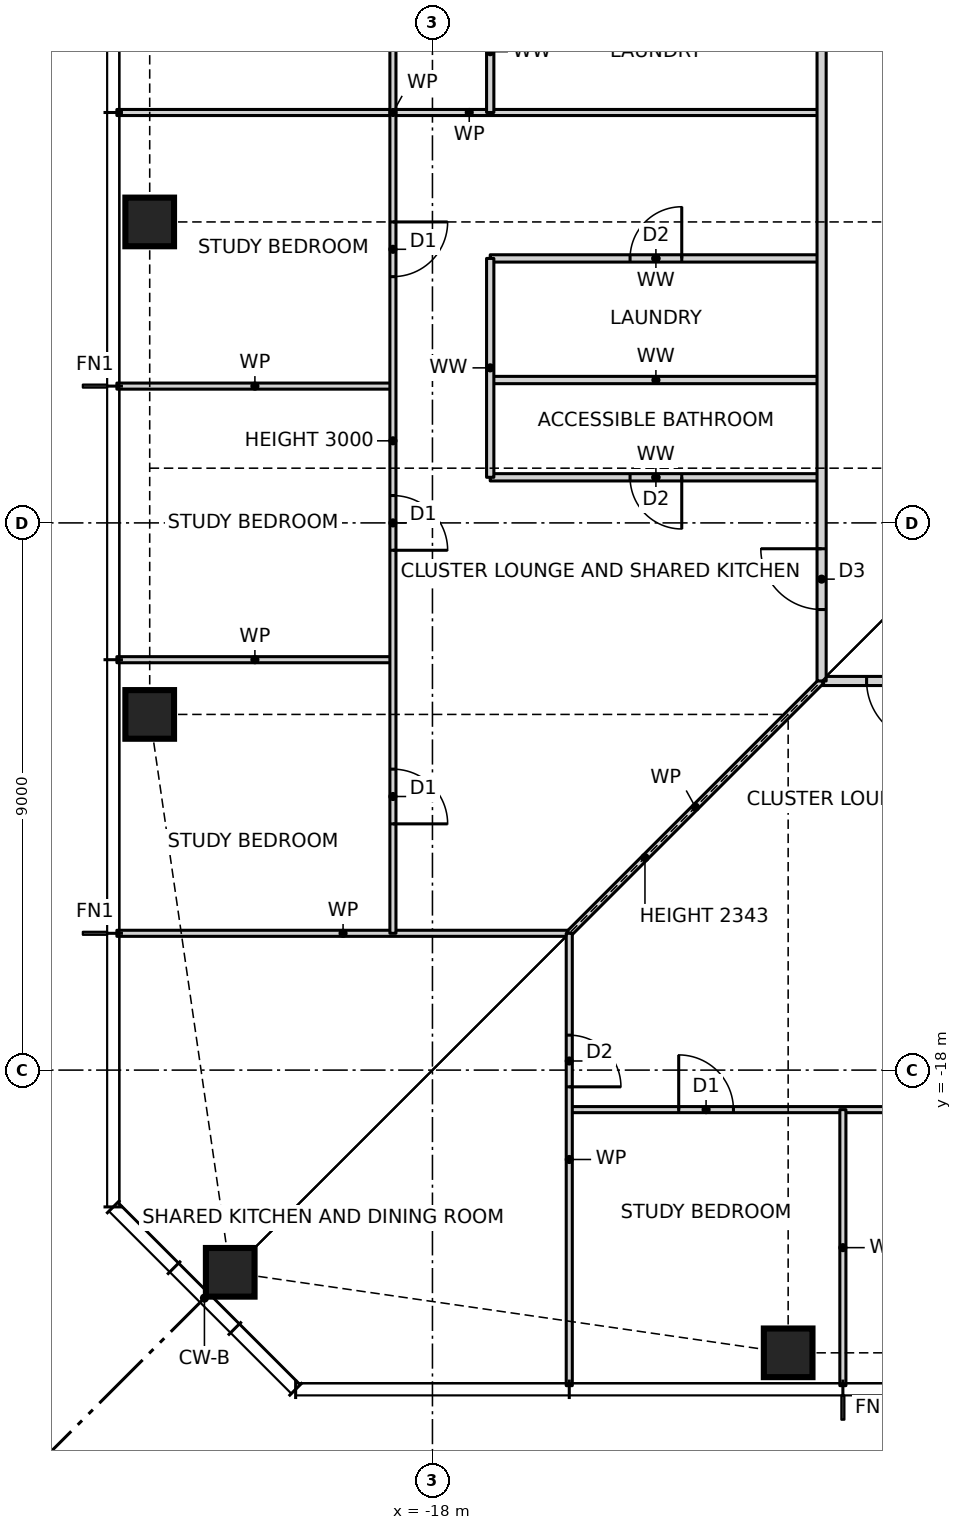
"""IFC4 building model, lengths in metres.
Left out: names, types, materials, properties, quantities, classifications, styles, units other than length and angle.
Written with IfcOpenShell. Run it as: python <this file> out.ifc"""

import sys

from ifc_helpers import new_model, si_unit, direction, frame, frame_2d, origin, origin_2d, place, context, subcontext, project, spatial, rectangle, hollow_rectangle, extrude, element, fill, save


model = new_model("IFC4")
c1 = context("Model", 3, precision=1e-05, world=origin(), true_north=direction((0.0, 1.0)))
c2 = subcontext(c1, "Body", "Model", "MODEL_VIEW")
j1 = project(units=[si_unit("LENGTHUNIT", "METRE"), si_unit("PLANEANGLEUNIT", "RADIAN")], contexts=[c1])
p1 = place(None, origin())
s1 = spatial("IfcSite", under=j1, at=p1, CompositionType="ELEMENT")
p2 = place(p1, origin())
s2 = spatial("IfcBuilding", under=s1, at=p2, CompositionType="ELEMENT")
p3 = place(p2, frame((0.0, 0.0, 67.5)))
s3 = spatial("IfcBuildingStorey", under=s2, at=p3, CompositionType="ELEMENT", Elevation=67.5)
for number, where, z_axis, x_axis in (
    (1, (-21.326, -21.326, 0.0), (0.0, 0.0, 1.0), (1.0, 0.0, 0.0)),
    (2, (-12.15, -22.65, 0.0), (0.0, 0.0, 1.0), (1.0, 0.0, 0.0)),
    (3, (-22.65, -4.05, 0.0), (0.0, 0.0, 1.0), (1.0, 0.0, 0.0)),
    (4, (-22.65, -12.15, 0.0), (0.0, 0.0, 1.0), (1.0, 0.0, 0.0)),
):
    element("IfcColumn", number, at=place(p3, frame(where, z_axis=z_axis, x_axis=x_axis)), inside=s3, PredefinedType="COLUMN", context=c2, shape_type="SweptSolid", body=[
        extrude(hollow_rectangle(XDim=0.8, YDim=0.8, WallThickness=0.09, at=origin_2d()), origin(), (0.0, 0.0, 1.0), 3.5),
    ])
p4 = place(p3, frame((-15.75, -18.65, 0.0), z_axis=(0.0, 0.0, 1.0), x_axis=(1.0, 0.0, 0.0)))
e5 = element("IfcWall", 5, at=p4, inside=s3, PredefinedType="PARTITIONING", context=c2, shape_type="SweptSolid", body=[
    extrude(rectangle(XDim=31.5, YDim=0.1, at=frame_2d((15.75, 0.0))), origin(), (0.0, 0.0, 1.0), 3.27),
])
p5 = place(p4, frame((1.8, 0.0, 0.0)))
e6 = element("IfcOpeningElement", 6, at=p5, cuts=e5, PredefinedType="OPENING", context=c2, shape_type="SweptSolid", body=[
    extrude(rectangle(XDim=0.9, YDim=2.1, at=frame_2d((0.45, 1.05))), frame((0.0, 0.06, 0.0), z_axis=(0.0, -1.0, 0.0), x_axis=(1.0, 0.0, 0.0)), (0.0, 0.0, 1.0), 0.12),
])
p6 = place(p4, frame((6.3, 0.0, 0.0)))
e7 = element("IfcOpeningElement", 7, at=p6, cuts=e5, PredefinedType="OPENING", context=c2, shape_type="SweptSolid", body=[
    extrude(rectangle(XDim=0.9, YDim=2.1, at=frame_2d((0.45, 1.05))), frame((0.0, 0.06, 0.0), z_axis=(0.0, -1.0, 0.0), x_axis=(1.0, 0.0, 0.0)), (0.0, 0.0, 1.0), 0.12),
])
p7 = place(p4, frame((10.8, 0.0, 0.0)))
e8 = element("IfcOpeningElement", 8, at=p7, cuts=e5, PredefinedType="OPENING", context=c2, shape_type="SweptSolid", body=[
    extrude(rectangle(XDim=0.9, YDim=2.1, at=frame_2d((0.45, 1.05))), frame((0.0, 0.06, 0.0), z_axis=(0.0, -1.0, 0.0), x_axis=(1.0, 0.0, 0.0)), (0.0, 0.0, 1.0), 0.12),
])
p8 = place(p4, frame((15.3, 0.0, 0.0)))
e9 = element("IfcOpeningElement", 9, at=p8, cuts=e5, PredefinedType="OPENING", context=c2, shape_type="SweptSolid", body=[
    extrude(rectangle(XDim=0.9, YDim=2.1, at=frame_2d((0.45, 1.05))), frame((0.0, 0.06, 0.0), z_axis=(0.0, -1.0, 0.0), x_axis=(1.0, 0.0, 0.0)), (0.0, 0.0, 1.0), 0.12),
])
p9 = place(p4, frame((19.8, 0.0, 0.0)))
e10 = element("IfcOpeningElement", 10, at=p9, cuts=e5, PredefinedType="OPENING", context=c2, shape_type="SweptSolid", body=[
    extrude(rectangle(XDim=0.9, YDim=2.1, at=frame_2d((0.45, 1.05))), frame((0.0, 0.06, 0.0), z_axis=(0.0, -1.0, 0.0), x_axis=(1.0, 0.0, 0.0)), (0.0, 0.0, 1.0), 0.12),
])
p10 = place(p4, frame((24.3, 0.0, 0.0)))
e11 = element("IfcOpeningElement", 11, at=p10, cuts=e5, PredefinedType="OPENING", context=c2, shape_type="SweptSolid", body=[
    extrude(rectangle(XDim=0.9, YDim=2.1, at=frame_2d((0.45, 1.05))), frame((0.0, 0.06, 0.0), z_axis=(0.0, -1.0, 0.0), x_axis=(1.0, 0.0, 0.0)), (0.0, 0.0, 1.0), 0.12),
])
p11 = place(p4, frame((28.8, 0.0, 0.0)))
e12 = element("IfcOpeningElement", 12, at=p11, cuts=e5, PredefinedType="OPENING", context=c2, shape_type="SweptSolid", body=[
    extrude(rectangle(XDim=0.9, YDim=2.1, at=frame_2d((0.45, 1.05))), frame((0.0, 0.06, 0.0), z_axis=(0.0, -1.0, 0.0), x_axis=(1.0, 0.0, 0.0)), (0.0, 0.0, 1.0), 0.12),
])
p12 = place(p3, frame((-23.19, -15.75, 0.0), z_axis=(0.0, 0.0, 1.0), x_axis=(1.0, 0.0, 0.0)))
e13 = element("IfcWall", 13, at=p12, inside=s3, PredefinedType="PARTITIONING", context=c2, shape_type="SweptSolid", body=[
    extrude(rectangle(XDim=7.44, YDim=0.1, at=frame_2d((3.72, 0.0))), origin(), (0.0, 0.0, 1.0), 3.27),
])
p13 = place(p3, frame((-11.6, -11.6, 0.0), z_axis=(0.0, 0.0, 1.0), x_axis=(1.0, 0.0, 0.0)))
e14 = element("IfcWall", 14, at=p13, inside=s3, PredefinedType="PARTITIONING", context=c2, shape_type="SweptSolid", body=[
    extrude(rectangle(XDim=24.2, YDim=0.15, at=frame_2d((12.1, 0.0))), origin(), (0.0, 0.0, 1.0), 3.27),
])
p14 = place(p13, frame((0.74, 0.0, 0.0)))
e15 = element("IfcOpeningElement", 15, at=p14, cuts=e14, PredefinedType="OPENING", context=c2, shape_type="SweptSolid", body=[
    extrude(rectangle(XDim=1.0, YDim=2.1, at=frame_2d((0.5, 1.05))), frame((0.0, 0.085, 0.0), z_axis=(0.0, -1.0, 0.0), x_axis=(1.0, 0.0, 0.0)), (0.0, 0.0, 1.0), 0.17),
])
p15 = place(p13, frame((21.025, 0.0, 0.0)))
e16 = element("IfcOpeningElement", 16, at=p15, cuts=e14, PredefinedType="OPENING", context=c2, shape_type="SweptSolid", body=[
    extrude(rectangle(XDim=1.0, YDim=2.1, at=frame_2d((0.5, 1.05))), frame((0.0, 0.085, 0.0), z_axis=(0.0, -1.0, 0.0), x_axis=(1.0, 0.0, 0.0)), (0.0, 0.0, 1.0), 0.17),
])
p16 = place(p3, frame((-23.19, -11.25, 0.0), z_axis=(0.0, 0.0, 1.0), x_axis=(1.0, 0.0, 0.0)))
e17 = element("IfcWall", 17, at=p16, inside=s3, PredefinedType="PARTITIONING", context=c2, shape_type="SweptSolid", body=[
    extrude(rectangle(XDim=4.54, YDim=0.1, at=frame_2d((2.27, 0.0))), origin(), (0.0, 0.0, 1.0), 3.27),
])
p17 = place(p3, frame((-17.05, -8.25, 0.0), z_axis=(0.0, 0.0, 1.0), x_axis=(1.0, 0.0, 0.0)))
e18 = element("IfcWall", 18, at=p17, inside=s3, PredefinedType="PARTITIONING", context=c2, shape_type="SweptSolid", body=[
    extrude(rectangle(XDim=5.45, YDim=0.12, at=frame_2d((2.725, 0.0))), origin(), (0.0, 0.0, 1.0), 3.27),
])
p18 = place(p17, frame((2.3, 0.0, 0.0)))
e19 = element("IfcOpeningElement", 19, at=p18, cuts=e18, PredefinedType="OPENING", context=c2, shape_type="SweptSolid", body=[
    extrude(rectangle(XDim=0.85, YDim=2.1, at=frame_2d((0.425, 1.05))), frame((0.0, 0.07, 0.0), z_axis=(0.0, -1.0, 0.0), x_axis=(1.0, 0.0, 0.0)), (0.0, 0.0, 1.0), 0.14),
])
p19 = place(p3, frame((-23.19, -6.75, 0.0), z_axis=(0.0, 0.0, 1.0), x_axis=(1.0, 0.0, 0.0)))
e20 = element("IfcWall", 20, at=p19, inside=s3, PredefinedType="PARTITIONING", context=c2, shape_type="SweptSolid", body=[
    extrude(rectangle(XDim=4.54, YDim=0.1, at=frame_2d((2.27, 0.0))), origin(), (0.0, 0.0, 1.0), 3.27),
])
p20 = place(p3, frame((-17.05, -6.65, 0.0), z_axis=(0.0, 0.0, 1.0), x_axis=(1.0, 0.0, 0.0)))
e21 = element("IfcWall", 21, at=p20, inside=s3, PredefinedType="PARTITIONING", context=c2, shape_type="SweptSolid", body=[
    extrude(rectangle(XDim=5.45, YDim=0.12, at=frame_2d((2.725, 0.0))), origin(), (0.0, 0.0, 1.0), 3.27),
])
p21 = place(p3, frame((-17.05, -4.65, 0.0), z_axis=(0.0, 0.0, 1.0), x_axis=(1.0, 0.0, 0.0)))
e22 = element("IfcWall", 22, at=p21, inside=s3, PredefinedType="PARTITIONING", context=c2, shape_type="SweptSolid", body=[
    extrude(rectangle(XDim=5.45, YDim=0.12, at=frame_2d((2.725, 0.0))), origin(), (0.0, 0.0, 1.0), 3.27),
])
p22 = place(p21, frame((2.3, 0.0, 0.0)))
e23 = element("IfcOpeningElement", 23, at=p22, cuts=e22, PredefinedType="OPENING", context=c2, shape_type="SweptSolid", body=[
    extrude(rectangle(XDim=0.85, YDim=2.1, at=frame_2d((0.425, 1.05))), frame((0.0, 0.07, 0.0), z_axis=(0.0, -1.0, 0.0), x_axis=(1.0, 0.0, 0.0)), (0.0, 0.0, 1.0), 0.14),
])
p23 = place(p3, frame((-23.19, -2.25, 0.0), z_axis=(0.0, 0.0, 1.0), x_axis=(1.0, 0.0, 0.0)))
e24 = element("IfcWall", 24, at=p23, inside=s3, PredefinedType="PARTITIONING", context=c2, shape_type="SweptSolid", body=[
    extrude(rectangle(XDim=11.59, YDim=0.1, at=frame_2d((5.795, 0.0))), origin(), (0.0, 0.0, 1.0), 3.27),
])
p24 = place(p3, frame((-15.75, -15.75, 0.0), z_axis=(0.0, 0.0, 1.0), x_axis=(0.707106781187, 0.707106781187, 0.0)))
e25 = element("IfcWall", 25, at=p24, inside=s3, PredefinedType="PARTITIONING", context=c2, shape_type="SweptSolid", body=[
    extrude(rectangle(XDim=5.869, YDim=0.1, at=frame_2d((2.935, 0.0))), origin(), (0.0, 0.0, 1.0), 2.343),
])
p25 = place(p3, frame((-11.25, -23.19, 0.0), z_axis=(0.0, 0.0, 1.0), x_axis=(0.0, 1.0, 0.0)))
e26 = element("IfcWall", 26, at=p25, inside=s3, PredefinedType="PARTITIONING", context=c2, shape_type="SweptSolid", body=[
    extrude(rectangle(XDim=4.54, YDim=0.1, at=frame_2d((2.27, 0.0))), origin(), (0.0, 0.0, 1.0), 3.27),
])
p26 = place(p3, frame((-11.6, -11.6, 0.0), z_axis=(0.0, 0.0, 1.0), x_axis=(0.0, 1.0, 0.0)))
e27 = element("IfcWall", 27, at=p26, inside=s3, PredefinedType="PARTITIONING", context=c2, shape_type="SweptSolid", body=[
    extrude(rectangle(XDim=23.2, YDim=0.15, at=frame_2d((11.6, 0.0))), origin(), (0.0, 0.0, 1.0), 3.27),
])
p27 = place(p26, frame((18.6, 0.0, 0.0)))
e28 = element("IfcOpeningElement", 28, at=p27, cuts=e27, PredefinedType="OPENING", context=c2, shape_type="SweptSolid", body=[
    extrude(rectangle(XDim=1.0, YDim=2.1, at=frame_2d((0.5, 1.05))), frame((0.0, 0.085, 0.0), z_axis=(0.0, -1.0, 0.0), x_axis=(1.0, 0.0, 0.0)), (0.0, 0.0, 1.0), 0.17),
])
p28 = place(p26, frame((1.175, 0.0, 0.0)))
e29 = element("IfcOpeningElement", 29, at=p28, cuts=e27, PredefinedType="OPENING", context=c2, shape_type="SweptSolid", body=[
    extrude(rectangle(XDim=1.0, YDim=2.1, at=frame_2d((0.5, 1.05))), frame((0.0, 0.085, 0.0), z_axis=(0.0, -1.0, 0.0), x_axis=(1.0, 0.0, 0.0)), (0.0, 0.0, 1.0), 0.17),
])
p29 = place(p3, frame((-15.75, -23.19, 0.0), z_axis=(0.0, 0.0, 1.0), x_axis=(0.0, 1.0, 0.0)))
e30 = element("IfcWall", 30, at=p29, inside=s3, PredefinedType="PARTITIONING", context=c2, shape_type="SweptSolid", body=[
    extrude(rectangle(XDim=7.44, YDim=0.1, at=frame_2d((3.72, 0.0))), origin(), (0.0, 0.0, 1.0), 3.27),
])
p30 = place(p29, frame((4.915, 0.0, 0.0)))
e31 = element("IfcOpeningElement", 31, at=p30, cuts=e30, PredefinedType="OPENING", context=c2, shape_type="SweptSolid", body=[
    extrude(rectangle(XDim=0.85, YDim=2.1, at=frame_2d((0.425, 1.05))), frame((0.0, 0.06, 0.0), z_axis=(0.0, -1.0, 0.0), x_axis=(1.0, 0.0, 0.0)), (0.0, 0.0, 1.0), 0.12),
])
p31 = place(p3, frame((-17.05, -8.25, 0.0), z_axis=(0.0, 0.0, 1.0), x_axis=(0.0, 1.0, 0.0)))
e32 = element("IfcWall", 32, at=p31, inside=s3, PredefinedType="PARTITIONING", context=c2, shape_type="SweptSolid", body=[
    extrude(rectangle(XDim=3.6, YDim=0.12, at=frame_2d((1.8, 0.0))), origin(), (0.0, 0.0, 1.0), 3.27),
])
p32 = place(p3, frame((-17.05, -2.25, 0.0), z_axis=(0.0, 0.0, 1.0), x_axis=(0.0, 1.0, 0.0)))
e33 = element("IfcWall", 33, at=p32, inside=s3, PredefinedType="PARTITIONING", context=c2, shape_type="SweptSolid", body=[
    extrude(rectangle(XDim=2.0, YDim=0.12, at=frame_2d((1.0, 0.0))), origin(), (0.0, 0.0, 1.0), 3.27),
])
p33 = place(p3, frame((-18.65, -15.75, 0.0), z_axis=(0.0, 0.0, 1.0), x_axis=(0.0, 1.0, 0.0)))
e34 = element("IfcWall", 34, at=p33, inside=s3, PredefinedType="PARTITIONING", context=c2, shape_type="SweptSolid", body=[
    extrude(rectangle(XDim=27.0, YDim=0.1, at=frame_2d((13.5, 0.0))), origin(), (0.0, 0.0, 1.0), 3.0),
])
p34 = place(p33, frame((24.3, 0.0, 0.0)))
e35 = element("IfcOpeningElement", 35, at=p34, cuts=e34, PredefinedType="OPENING", context=c2, shape_type="SweptSolid", body=[
    extrude(rectangle(XDim=0.9, YDim=2.1, at=frame_2d((0.45, 1.05))), frame((0.0, 0.06, 0.0), z_axis=(0.0, -1.0, 0.0), x_axis=(1.0, 0.0, 0.0)), (0.0, 0.0, 1.0), 0.12),
])
p35 = place(p33, frame((19.8, 0.0, 0.0)))
e36 = element("IfcOpeningElement", 36, at=p35, cuts=e34, PredefinedType="OPENING", context=c2, shape_type="SweptSolid", body=[
    extrude(rectangle(XDim=0.9, YDim=2.1, at=frame_2d((0.45, 1.05))), frame((0.0, 0.06, 0.0), z_axis=(0.0, -1.0, 0.0), x_axis=(1.0, 0.0, 0.0)), (0.0, 0.0, 1.0), 0.12),
])
p36 = place(p33, frame((15.3, 0.0, 0.0)))
e37 = element("IfcOpeningElement", 37, at=p36, cuts=e34, PredefinedType="OPENING", context=c2, shape_type="SweptSolid", body=[
    extrude(rectangle(XDim=0.9, YDim=2.1, at=frame_2d((0.45, 1.05))), frame((0.0, 0.06, 0.0), z_axis=(0.0, -1.0, 0.0), x_axis=(1.0, 0.0, 0.0)), (0.0, 0.0, 1.0), 0.12),
])
p37 = place(p33, frame((10.8, 0.0, 0.0)))
e38 = element("IfcOpeningElement", 38, at=p37, cuts=e34, PredefinedType="OPENING", context=c2, shape_type="SweptSolid", body=[
    extrude(rectangle(XDim=0.9, YDim=2.1, at=frame_2d((0.45, 1.05))), frame((0.0, 0.06, 0.0), z_axis=(0.0, -1.0, 0.0), x_axis=(1.0, 0.0, 0.0)), (0.0, 0.0, 1.0), 0.12),
])
p38 = place(p33, frame((6.3, 0.0, 0.0)))
e39 = element("IfcOpeningElement", 39, at=p38, cuts=e34, PredefinedType="OPENING", context=c2, shape_type="SweptSolid", body=[
    extrude(rectangle(XDim=0.9, YDim=2.1, at=frame_2d((0.45, 1.05))), frame((0.0, 0.06, 0.0), z_axis=(0.0, -1.0, 0.0), x_axis=(1.0, 0.0, 0.0)), (0.0, 0.0, 1.0), 0.12),
])
p39 = place(p33, frame((1.8, 0.0, 0.0)))
e40 = element("IfcOpeningElement", 40, at=p39, cuts=e34, PredefinedType="OPENING", context=c2, shape_type="SweptSolid", body=[
    extrude(rectangle(XDim=0.9, YDim=2.1, at=frame_2d((0.45, 1.05))), frame((0.0, 0.06, 0.0), z_axis=(0.0, -1.0, 0.0), x_axis=(1.0, 0.0, 0.0)), (0.0, 0.0, 1.0), 0.12),
])
p40 = place(p5, origin())
e41 = element("IfcDoor", 41, at=p40, inside=s3, OperationType="SINGLE_SWING_LEFT", PredefinedType="DOOR", context=c2, shape_type="SweptSolid", body=[
    extrude(rectangle(XDim=0.9, YDim=2.1, at=frame_2d((0.45, 1.05))), frame((0.0, 0.025, 0.0), z_axis=(0.0, -1.0, 0.0), x_axis=(1.0, 0.0, 0.0)), (0.0, 0.0, 1.0), 0.05),
])
fill(e6, e41)
p41 = place(p14, frame((1.0, 0.0, 0.0), z_axis=(0.0, 0.0, 1.0), x_axis=(-1.0, 0.0, 0.0)))
e42 = element("IfcDoor", 42, at=p41, inside=s3, OperationType="SINGLE_SWING_LEFT", PredefinedType="DOOR", context=c2, shape_type="SweptSolid", body=[
    extrude(rectangle(XDim=1.0, YDim=2.1, at=frame_2d((0.5, 1.05))), frame((0.0, 0.025, 0.0), z_axis=(0.0, -1.0, 0.0), x_axis=(1.0, 0.0, 0.0)), (0.0, 0.0, 1.0), 0.05),
])
fill(e15, e42)
p42 = place(p37, frame((0.9, 0.0, 0.0), z_axis=(0.0, 0.0, 1.0), x_axis=(-1.0, 0.0, 0.0)))
e43 = element("IfcDoor", 43, at=p42, inside=s3, OperationType="SINGLE_SWING_LEFT", PredefinedType="DOOR", context=c2, shape_type="SweptSolid", body=[
    extrude(rectangle(XDim=0.9, YDim=2.1, at=frame_2d((0.45, 1.05))), frame((0.0, 0.025, 0.0), z_axis=(0.0, -1.0, 0.0), x_axis=(1.0, 0.0, 0.0)), (0.0, 0.0, 1.0), 0.05),
])
fill(e38, e43)
p43 = place(p38, frame((0.9, 0.0, 0.0), z_axis=(0.0, 0.0, 1.0), x_axis=(-1.0, 0.0, 0.0)))
e44 = element("IfcDoor", 44, at=p43, inside=s3, OperationType="SINGLE_SWING_RIGHT", PredefinedType="DOOR", context=c2, shape_type="SweptSolid", body=[
    extrude(rectangle(XDim=0.9, YDim=2.1, at=frame_2d((0.45, 1.05))), frame((0.0, 0.025, 0.0), z_axis=(0.0, -1.0, 0.0), x_axis=(1.0, 0.0, 0.0)), (0.0, 0.0, 1.0), 0.05),
])
fill(e39, e44)
p44 = place(p39, frame((0.9, 0.0, 0.0), z_axis=(0.0, 0.0, 1.0), x_axis=(-1.0, 0.0, 0.0)))
e45 = element("IfcDoor", 45, at=p44, inside=s3, OperationType="SINGLE_SWING_RIGHT", PredefinedType="DOOR", context=c2, shape_type="SweptSolid", body=[
    extrude(rectangle(XDim=0.9, YDim=2.1, at=frame_2d((0.45, 1.05))), frame((0.0, 0.025, 0.0), z_axis=(0.0, -1.0, 0.0), x_axis=(1.0, 0.0, 0.0)), (0.0, 0.0, 1.0), 0.05),
])
fill(e40, e45)
p45 = place(p28, origin())
e46 = element("IfcDoor", 46, at=p45, inside=s3, OperationType="SINGLE_SWING_RIGHT", PredefinedType="DOOR", context=c2, shape_type="SweptSolid", body=[
    extrude(rectangle(XDim=1.0, YDim=2.1, at=frame_2d((0.5, 1.05))), frame((0.0, 0.025, 0.0), z_axis=(0.0, -1.0, 0.0), x_axis=(1.0, 0.0, 0.0)), (0.0, 0.0, 1.0), 0.05),
])
fill(e29, e46)
p46 = place(p22, origin())
e47 = element("IfcDoor", 47, at=p46, inside=s3, OperationType="SINGLE_SWING_RIGHT", PredefinedType="DOOR", context=c2, shape_type="SweptSolid", body=[
    extrude(rectangle(XDim=0.85, YDim=2.1, at=frame_2d((0.425, 1.05))), frame((0.0, 0.025, 0.0), z_axis=(0.0, -1.0, 0.0), x_axis=(1.0, 0.0, 0.0)), (0.0, 0.0, 1.0), 0.05),
])
fill(e23, e47)
p47 = place(p18, frame((0.85, 0.0, 0.0), z_axis=(0.0, 0.0, 1.0), x_axis=(-1.0, 0.0, 0.0)))
e48 = element("IfcDoor", 48, at=p47, inside=s3, OperationType="SINGLE_SWING_LEFT", PredefinedType="DOOR", context=c2, shape_type="SweptSolid", body=[
    extrude(rectangle(XDim=0.85, YDim=2.1, at=frame_2d((0.425, 1.05))), frame((0.0, 0.025, 0.0), z_axis=(0.0, -1.0, 0.0), x_axis=(1.0, 0.0, 0.0)), (0.0, 0.0, 1.0), 0.05),
])
fill(e19, e48)
p48 = place(p30, frame((0.85, 0.0, 0.0), z_axis=(0.0, 0.0, 1.0), x_axis=(-1.0, 0.0, 0.0)))
e49 = element("IfcDoor", 49, at=p48, inside=s3, OperationType="SINGLE_SWING_RIGHT", PredefinedType="DOOR", context=c2, shape_type="SweptSolid", body=[
    extrude(rectangle(XDim=0.85, YDim=2.1, at=frame_2d((0.425, 1.05))), frame((0.0, 0.025, 0.0), z_axis=(0.0, -1.0, 0.0), x_axis=(1.0, 0.0, 0.0)), (0.0, 0.0, 1.0), 0.05),
])
fill(e31, e49)
save(model, sys.argv[1])
